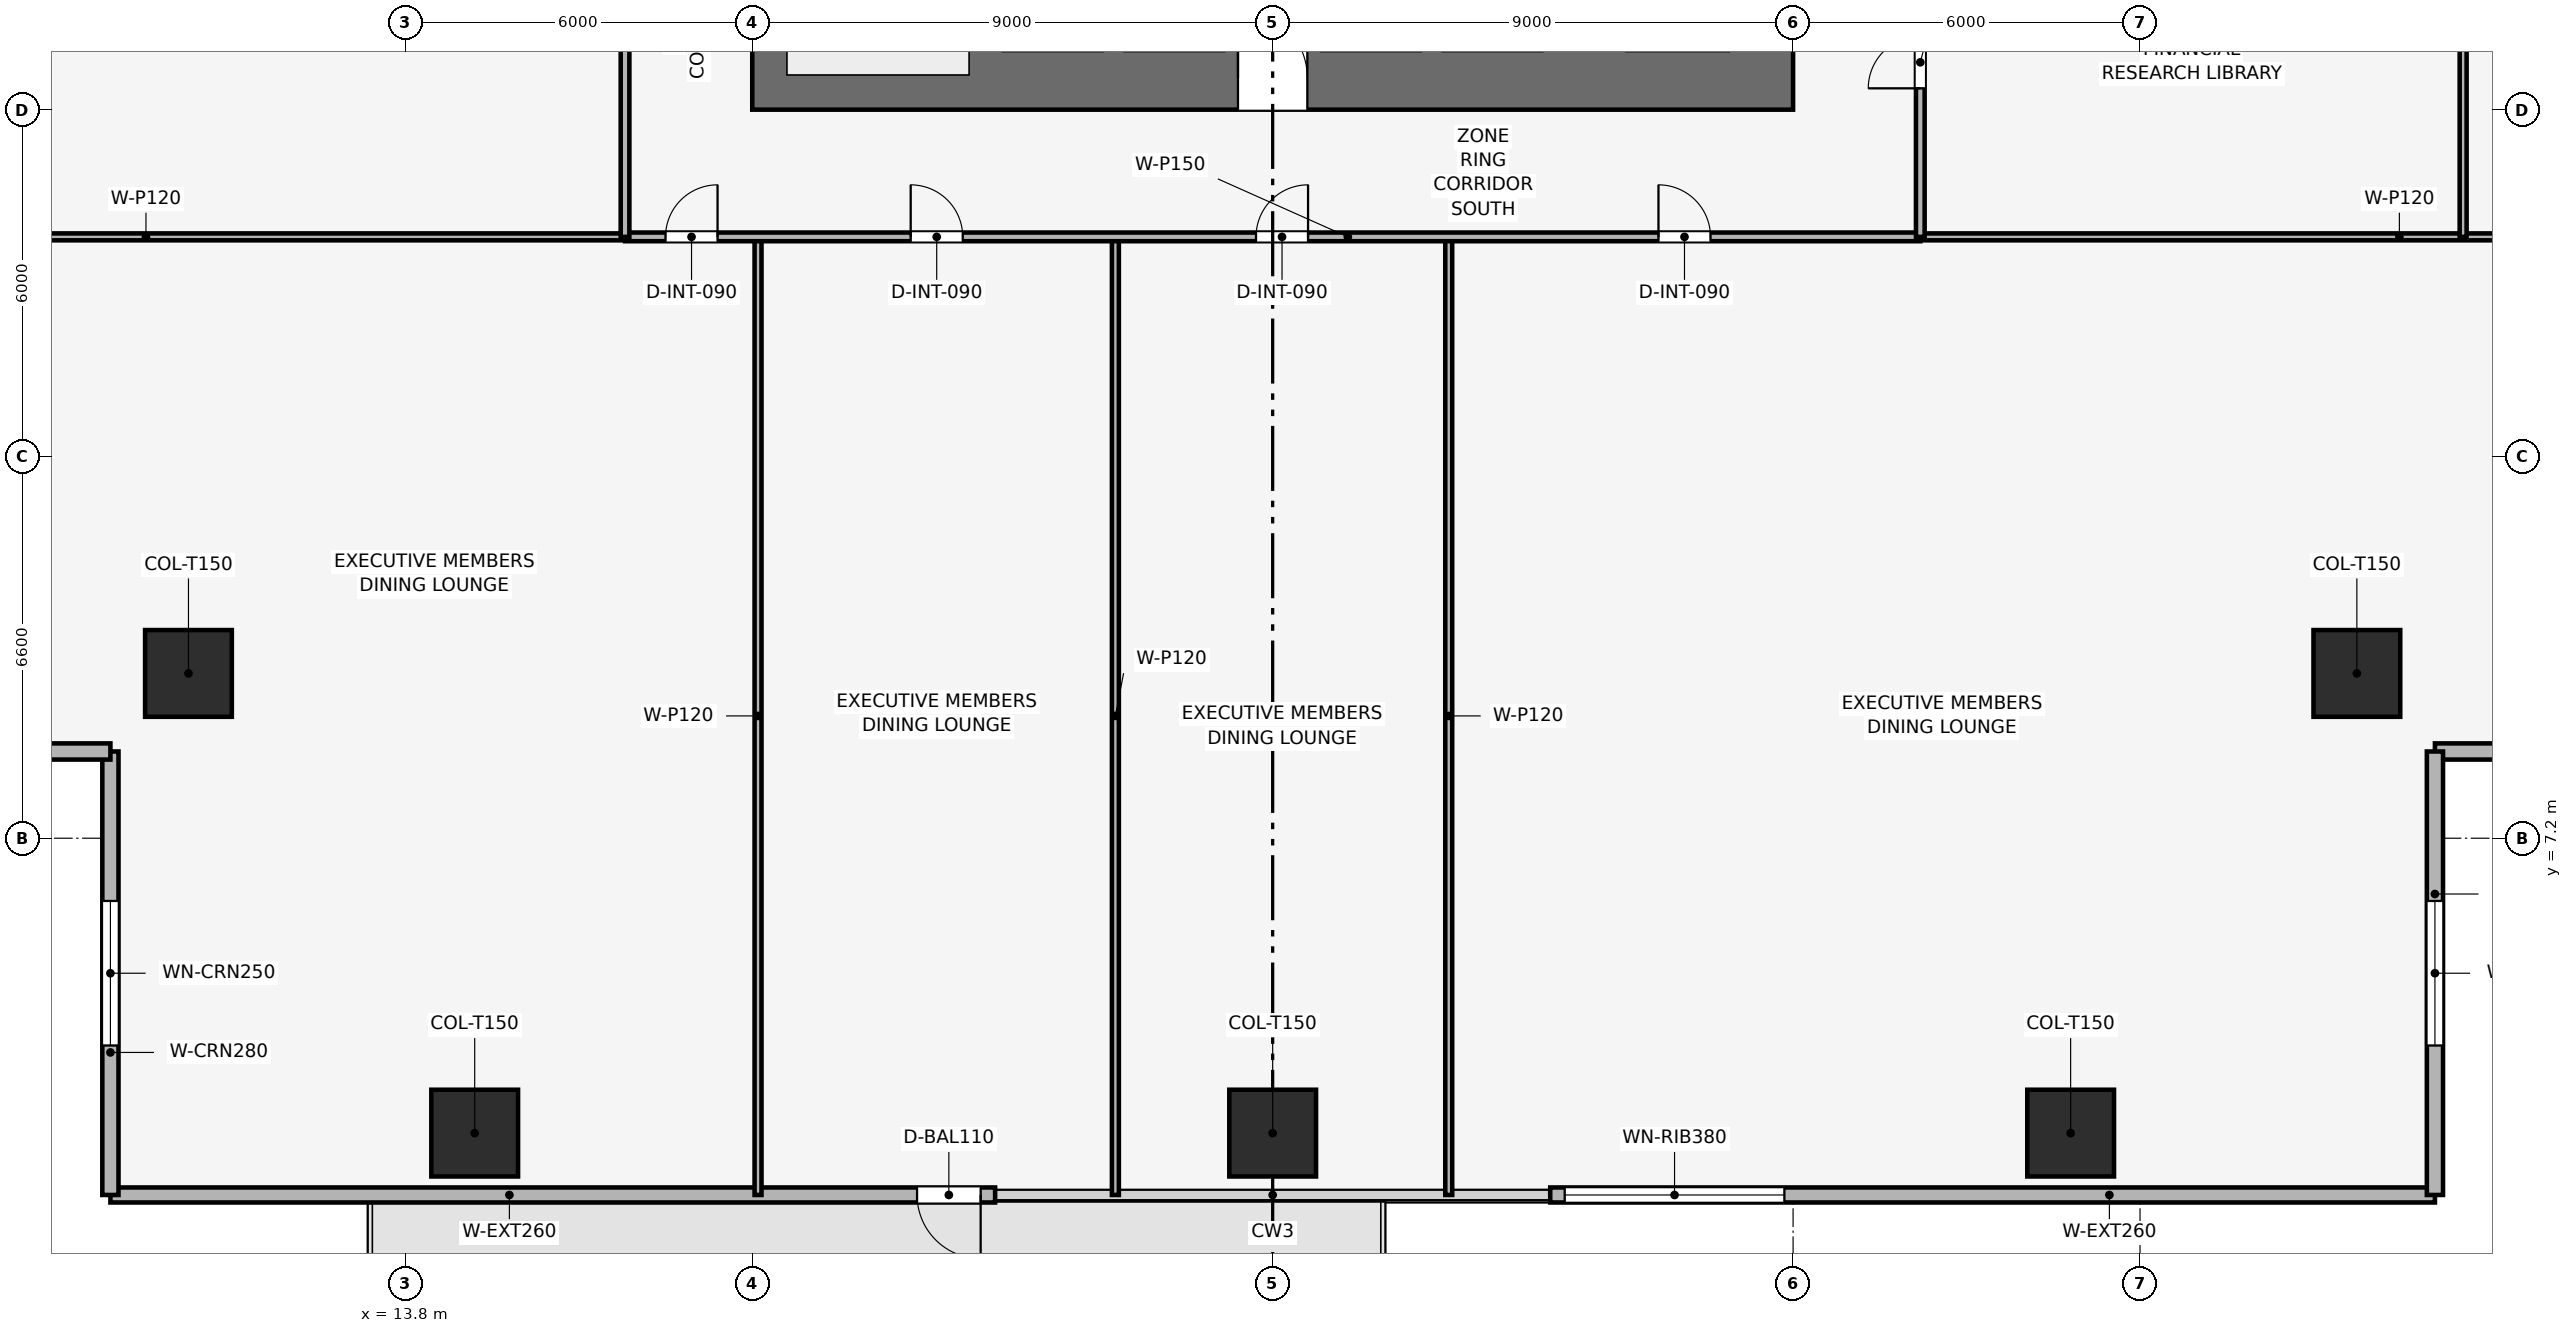
"""IFC4 building model, lengths in metres.
Left out: names, types, materials, properties, quantities, classifications, styles, units other than length and angle.
Written with IfcOpenShell. Run it as: python <this file> out.ifc"""

import sys

from ifc_helpers import new_model, si_unit, direction, frame, frame_2d, origin, origin_2d, place, context, subcontext, project, spatial, rectangle, extrude, element, fill, save


model = new_model("IFC4")
c1 = context("Model", 3, precision=1e-05, world=origin(), true_north=direction((0.0, 1.0)))
c2 = subcontext(c1, "Body", "Model", "MODEL_VIEW")
j1 = project(units=[si_unit("LENGTHUNIT", "METRE"), si_unit("PLANEANGLEUNIT", "RADIAN")], contexts=[c1])
p1 = place(None, origin())
s1 = spatial("IfcSite", under=j1, at=p1, CompositionType="ELEMENT")
p2 = place(p1, origin())
s2 = spatial("IfcBuilding", under=s1, at=p2, CompositionType="ELEMENT")
p3 = place(p2, frame((0.0, 0.0, 41.7)))
s3 = spatial("IfcBuildingStorey", under=s2, at=p3, CompositionType="ELEMENT", Elevation=41.7)
p4 = place(p3, frame((19.8, 20.35, 0.0), z_axis=(0.0, 0.0, 1.0), x_axis=(1.0, 0.0, 0.0)))
e1 = element("IfcWall", 1, at=p4, inside=s3, PredefinedType="SHEAR", context=c2, shape_type="SweptSolid", body=[
    extrude(rectangle(XDim=18.0, YDim=1.1, at=frame_2d((9.0, 0.0))), origin(), (0.0, 0.0, 1.0), 3.9),
])
p5 = place(p4, frame((8.4, 0.0, 0.0)))
e2 = element("IfcOpeningElement", 2, at=p5, cuts=e1, PredefinedType="OPENING", context=c2, shape_type="SweptSolid", body=[
    extrude(rectangle(XDim=1.2, YDim=2.2, at=frame_2d((0.6, 1.1))), frame((0.0, 0.56, 0.0), z_axis=(0.0, -1.0, 0.0), x_axis=(1.0, 0.0, 0.0)), (0.0, 0.0, 1.0), 1.12),
])
for number, where, z_axis, x_axis in (
    (3, (15.0, 2.1, 0.003), (0.0, 0.0, 1.0), (1.0, 0.0, 0.0)),
    (4, (28.8, 2.1, 0.003), (0.0, 0.0, 1.0), (1.0, 0.0, 0.0)),
    (5, (42.6, 2.1, 0.003), (0.0, 0.0, 1.0), (1.0, 0.0, 0.0)),
    (6, (10.05, 10.05, 0.003), (0.0, 0.0, 1.0), (1.0, 0.0, 0.0)),
    (7, (47.55, 10.05, 0.003), (0.0, 0.0, 1.0), (1.0, 0.0, 0.0)),
):
    element("IfcColumn", number, at=place(p3, frame(where, z_axis=z_axis, x_axis=x_axis)), inside=s3, PredefinedType="COLUMN", context=c2, shape_type="SweptSolid", body=[
        extrude(rectangle(XDim=1.5, YDim=1.5, at=origin_2d()), origin(), (0.0, 0.0, 1.0), 3.644),
    ])
p6 = place(p3, frame((48.9, 1.03, 0.0), z_axis=(0.0, 0.0, 1.0), x_axis=(-1.0, 0.0, 0.0)))
e8 = element("IfcWall", 8, at=p6, inside=s3, PredefinedType="SOLIDWALL", context=c2, shape_type="SweptSolid", body=[
    extrude(rectangle(XDim=15.3, YDim=0.26, at=frame_2d((7.65, 0.0))), origin(), (0.0, 0.0, 1.0), 3.65),
])
p7 = place(p6, frame((11.25, 0.0, 0.9)))
e9 = element("IfcOpeningElement", 9, at=p7, cuts=e8, PredefinedType="OPENING", context=c2, shape_type="SweptSolid", body=[
    extrude(rectangle(XDim=3.8, YDim=1.9, at=frame_2d((1.9, 0.95))), frame((0.0, 0.14, 0.0), z_axis=(0.0, -1.0, 0.0), x_axis=(1.0, 0.0, 0.0)), (0.0, 0.0, 1.0), 0.28),
])
p8 = place(p3, frame((24.0, 1.03, 0.0), z_axis=(0.0, 0.0, 1.0), x_axis=(-1.0, 0.0, 0.0)))
e10 = element("IfcWall", 10, at=p8, inside=s3, PredefinedType="SOLIDWALL", context=c2, shape_type="SweptSolid", body=[
    extrude(rectangle(XDim=15.3, YDim=0.26, at=frame_2d((7.65, 0.0))), origin(), (0.0, 0.0, 1.0), 3.65),
])
p9 = place(p8, frame((0.25, 0.0, 0.0)))
e11 = element("IfcOpeningElement", 11, at=p9, cuts=e10, PredefinedType="OPENING", context=c2, shape_type="SweptSolid", body=[
    extrude(rectangle(XDim=1.1, YDim=2.2, at=frame_2d((0.55, 1.1))), frame((0.0, 0.14, 0.0), z_axis=(0.0, -1.0, 0.0), x_axis=(1.0, 0.0, 0.0)), (0.0, 0.0, 1.0), 0.28),
])
p10 = place(p3, frame((8.7, 1.03, 0.0), z_axis=(0.0, 0.0, 1.0), x_axis=(0.0, 1.0, 0.0)))
e12 = element("IfcWall", 12, at=p10, inside=s3, PredefinedType="SOLIDWALL", context=c2, shape_type="SweptSolid", body=[
    extrude(rectangle(XDim=7.67, YDim=0.28, at=frame_2d((3.835, 0.0))), origin(), (0.0, 0.0, 1.0), 3.65),
])
p11 = place(p10, frame((2.585, 0.0, 0.9)))
e13 = element("IfcOpeningElement", 13, at=p11, cuts=e12, PredefinedType="OPENING", context=c2, shape_type="SweptSolid", body=[
    extrude(rectangle(XDim=2.5, YDim=1.9, at=frame_2d((1.25, 0.95))), frame((0.0, 0.15, 0.0), z_axis=(0.0, -1.0, 0.0), x_axis=(1.0, 0.0, 0.0)), (0.0, 0.0, 1.0), 0.3),
])
p12 = place(p3, frame((8.7, 8.7, 0.0), z_axis=(0.0, 0.0, 1.0), x_axis=(-1.0, 0.0, 0.0)))
e14 = element("IfcWall", 14, at=p12, inside=s3, PredefinedType="SOLIDWALL", context=c2, shape_type="SweptSolid", body=[
    extrude(rectangle(XDim=7.67, YDim=0.28, at=frame_2d((3.835, 0.0))), origin(), (0.0, 0.0, 1.0), 3.65),
])
p13 = place(p12, frame((2.585, 0.0, 0.9)))
e15 = element("IfcOpeningElement", 15, at=p13, cuts=e14, PredefinedType="OPENING", context=c2, shape_type="SweptSolid", body=[
    extrude(rectangle(XDim=2.5, YDim=1.9, at=frame_2d((1.25, 0.95))), frame((0.0, 0.15, 0.0), z_axis=(0.0, -1.0, 0.0), x_axis=(1.0, 0.0, 0.0)), (0.0, 0.0, 1.0), 0.3),
])
p14 = place(p3, frame((56.57, 8.7, 0.0), z_axis=(0.0, 0.0, 1.0), x_axis=(-1.0, 0.0, 0.0)))
e16 = element("IfcWall", 16, at=p14, inside=s3, PredefinedType="SOLIDWALL", context=c2, shape_type="SweptSolid", body=[
    extrude(rectangle(XDim=7.67, YDim=0.28, at=frame_2d((3.835, 0.0))), origin(), (0.0, 0.0, 1.0), 3.65),
])
p15 = place(p14, frame((2.585, 0.0, 0.9)))
e17 = element("IfcOpeningElement", 17, at=p15, cuts=e16, PredefinedType="OPENING", context=c2, shape_type="SweptSolid", body=[
    extrude(rectangle(XDim=2.5, YDim=1.9, at=frame_2d((1.25, 0.95))), frame((0.0, 0.15, 0.0), z_axis=(0.0, -1.0, 0.0), x_axis=(1.0, 0.0, 0.0)), (0.0, 0.0, 1.0), 0.3),
])
p16 = place(p3, frame((48.9, 8.7, 0.0), z_axis=(0.0, 0.0, 1.0), x_axis=(0.0, -1.0, 0.0)))
e18 = element("IfcWall", 18, at=p16, inside=s3, PredefinedType="SOLIDWALL", context=c2, shape_type="SweptSolid", body=[
    extrude(rectangle(XDim=7.67, YDim=0.28, at=frame_2d((3.835, 0.0))), origin(), (0.0, 0.0, 1.0), 3.65),
])
p17 = place(p16, frame((2.585, 0.0, 0.9)))
e19 = element("IfcOpeningElement", 19, at=p17, cuts=e18, PredefinedType="OPENING", context=c2, shape_type="SweptSolid", body=[
    extrude(rectangle(XDim=2.5, YDim=1.9, at=frame_2d((1.25, 0.95))), frame((0.0, 0.15, 0.0), z_axis=(0.0, -1.0, 0.0), x_axis=(1.0, 0.0, 0.0)), (0.0, 0.0, 1.0), 0.3),
])
for number, where, z_axis, x_axis in (
    (20, (19.9, 1.03, 0.0), (0.0, 0.0, 1.0), (0.0, 1.0, 0.0)),
    (21, (26.08, 1.03, 0.0), (0.0, 0.0, 1.0), (0.0, 1.0, 0.0)),
    (22, (31.845, 1.03, 0.0), (0.0, 0.0, 1.0), (0.0, 1.0, 0.0)),
    (23, (1.03, 17.6, 0.0), (0.0, 0.0, 1.0), (1.0, 0.0, 0.0)),
    (24, (40.0, 17.6, 0.0), (0.0, 0.0, 1.0), (1.0, 0.0, 0.0)),
):
    element("IfcWall", number, at=place(p3, frame(where, z_axis=z_axis, x_axis=x_axis)), inside=s3, PredefinedType="PARTITIONING", context=c2, shape_type="SweptSolid", body=[
        extrude(rectangle(XDim=16.57, YDim=0.12, at=frame_2d((8.285, 0.0))), origin(), (0.0, 0.0, 1.0), 2.935),
    ])
p18 = place(p3, frame((49.388, 17.6, 0.0), z_axis=(0.0, 0.0, 1.0), x_axis=(0.0, 1.0, 0.0)))
e25 = element("IfcWall", 25, at=p18, inside=s3, PredefinedType="PARTITIONING", context=c2, shape_type="SweptSolid", body=[
    extrude(rectangle(XDim=6.038, YDim=0.12, at=frame_2d((3.019, 0.0))), origin(), (0.0, 0.0, 1.0), 3.085),
])
p19 = place(p18, frame((3.753, 0.0, 0.0)))
e26 = element("IfcOpeningElement", 26, at=p19, cuts=e25, PredefinedType="OPENING", context=c2, shape_type="SweptSolid", body=[
    extrude(rectangle(XDim=0.9, YDim=2.1, at=frame_2d((0.45, 1.05))), frame((0.0, 0.07, 0.0), z_axis=(0.0, -1.0, 0.0), x_axis=(1.0, 0.0, 0.0)), (0.0, 0.0, 1.0), 0.14),
])
p20 = place(p3, frame((17.6, 17.6, 0.0), z_axis=(0.0, 0.0, 1.0), x_axis=(1.0, 0.0, 0.0)))
e27 = element("IfcWall", 27, at=p20, inside=s3, PredefinedType="PARTITIONING", context=c2, shape_type="SweptSolid", body=[
    extrude(rectangle(XDim=22.4, YDim=0.15, at=frame_2d((11.2, 0.0))), origin(), (0.0, 0.0, 1.0), 3.085),
])
p21 = place(p20, frame((0.7, 0.0, 0.0)))
e28 = element("IfcOpeningElement", 28, at=p21, cuts=e27, PredefinedType="OPENING", context=c2, shape_type="SweptSolid", body=[
    extrude(rectangle(XDim=0.9, YDim=2.1, at=frame_2d((0.45, 1.05))), frame((0.0, 0.085, 0.0), z_axis=(0.0, -1.0, 0.0), x_axis=(1.0, 0.0, 0.0)), (0.0, 0.0, 1.0), 0.17),
])
p22 = place(p20, frame((4.94, 0.0, 0.0)))
e29 = element("IfcOpeningElement", 29, at=p22, cuts=e27, PredefinedType="OPENING", context=c2, shape_type="SweptSolid", body=[
    extrude(rectangle(XDim=0.9, YDim=2.1, at=frame_2d((0.45, 1.05))), frame((0.0, 0.085, 0.0), z_axis=(0.0, -1.0, 0.0), x_axis=(1.0, 0.0, 0.0)), (0.0, 0.0, 1.0), 0.17),
])
p23 = place(p20, frame((10.912, 0.0, 0.0)))
e30 = element("IfcOpeningElement", 30, at=p23, cuts=e27, PredefinedType="OPENING", context=c2, shape_type="SweptSolid", body=[
    extrude(rectangle(XDim=0.9, YDim=2.1, at=frame_2d((0.45, 1.05))), frame((0.0, 0.085, 0.0), z_axis=(0.0, -1.0, 0.0), x_axis=(1.0, 0.0, 0.0)), (0.0, 0.0, 1.0), 0.17),
])
p24 = place(p20, frame((17.872, 0.0, 0.0)))
e31 = element("IfcOpeningElement", 31, at=p24, cuts=e27, PredefinedType="OPENING", context=c2, shape_type="SweptSolid", body=[
    extrude(rectangle(XDim=0.9, YDim=2.1, at=frame_2d((0.45, 1.05))), frame((0.0, 0.085, 0.0), z_axis=(0.0, -1.0, 0.0), x_axis=(1.0, 0.0, 0.0)), (0.0, 0.0, 1.0), 0.17),
])
p25 = place(p3, frame((17.6, 17.6, 0.0), z_axis=(0.0, 0.0, 1.0), x_axis=(0.0, 1.0, 0.0)))
e32 = element("IfcWall", 32, at=p25, inside=s3, PredefinedType="PARTITIONING", context=c2, shape_type="SweptSolid", body=[
    extrude(rectangle(XDim=22.4, YDim=0.15, at=frame_2d((11.2, 0.0))), origin(), (0.0, 0.0, 1.0), 3.085),
])
p26 = place(p25, frame((10.75, 0.0, 0.0)))
e33 = element("IfcOpeningElement", 33, at=p26, cuts=e32, PredefinedType="OPENING", context=c2, shape_type="SweptSolid", body=[
    extrude(rectangle(XDim=0.9, YDim=2.1, at=frame_2d((0.45, 1.05))), frame((0.0, 0.085, 0.0), z_axis=(0.0, -1.0, 0.0), x_axis=(1.0, 0.0, 0.0)), (0.0, 0.0, 1.0), 0.17),
])
p27 = place(p3, frame((40.0, 17.6, 0.0), z_axis=(0.0, 0.0, 1.0), x_axis=(0.0, 1.0, 0.0)))
e34 = element("IfcWall", 34, at=p27, inside=s3, PredefinedType="PARTITIONING", context=c2, shape_type="SweptSolid", body=[
    extrude(rectangle(XDim=22.4, YDim=0.15, at=frame_2d((11.2, 0.0))), origin(), (0.0, 0.0, 1.0), 3.085),
])
p28 = place(p27, frame((2.569, 0.0, 0.0)))
e35 = element("IfcOpeningElement", 35, at=p28, cuts=e34, PredefinedType="OPENING", context=c2, shape_type="SweptSolid", body=[
    extrude(rectangle(XDim=0.9, YDim=2.1, at=frame_2d((0.45, 1.05))), frame((0.0, 0.085, 0.0), z_axis=(0.0, -1.0, 0.0), x_axis=(1.0, 0.0, 0.0)), (0.0, 0.0, 1.0), 0.17),
])
p29 = place(p27, frame((13.769, 0.0, 0.0)))
e36 = element("IfcOpeningElement", 36, at=p29, cuts=e34, PredefinedType="OPENING", context=c2, shape_type="SweptSolid", body=[
    extrude(rectangle(XDim=0.9, YDim=2.1, at=frame_2d((0.45, 1.05))), frame((0.0, 0.085, 0.0), z_axis=(0.0, -1.0, 0.0), x_axis=(1.0, 0.0, 0.0)), (0.0, 0.0, 1.0), 0.17),
])
p30 = place(p9, origin())
e37 = element("IfcDoor", 37, at=p30, inside=s3, OperationType="SINGLE_SWING_LEFT", PredefinedType="DOOR", context=c2, shape_type="SweptSolid", body=[
    extrude(rectangle(XDim=1.1, YDim=2.2, at=frame_2d((0.55, 1.1))), frame((0.0, 0.025, 0.0), z_axis=(0.0, -1.0, 0.0), x_axis=(1.0, 0.0, 0.0)), (0.0, 0.0, 1.0), 0.05),
])
fill(e11, e37)
p31 = place(p7, origin())
e38 = element("IfcWindow", 38, at=p31, inside=s3, PartitioningType="SINGLE_PANEL", PredefinedType="WINDOW", context=c2, shape_type="SweptSolid", body=[
    extrude(rectangle(XDim=3.8, YDim=1.9, at=frame_2d((1.9, 0.95))), frame((0.0, 0.03, 0.0), z_axis=(0.0, -1.0, 0.0), x_axis=(1.0, 0.0, 0.0)), (0.0, 0.0, 1.0), 0.06),
])
fill(e9, e38)
p32 = place(p11, origin())
e39 = element("IfcWindow", 39, at=p32, inside=s3, PartitioningType="SINGLE_PANEL", PredefinedType="WINDOW", context=c2, shape_type="SweptSolid", body=[
    extrude(rectangle(XDim=2.5, YDim=1.9, at=frame_2d((1.25, 0.95))), frame((0.0, 0.03, 0.0), z_axis=(0.0, -1.0, 0.0), x_axis=(1.0, 0.0, 0.0)), (0.0, 0.0, 1.0), 0.06),
])
fill(e13, e39)
p33 = place(p17, origin())
e40 = element("IfcWindow", 40, at=p33, inside=s3, PartitioningType="SINGLE_PANEL", PredefinedType="WINDOW", context=c2, shape_type="SweptSolid", body=[
    extrude(rectangle(XDim=2.5, YDim=1.9, at=frame_2d((1.25, 0.95))), frame((0.0, 0.03, 0.0), z_axis=(0.0, -1.0, 0.0), x_axis=(1.0, 0.0, 0.0)), (0.0, 0.0, 1.0), 0.06),
])
fill(e19, e40)
p34 = place(p21, origin())
e41 = element("IfcDoor", 41, at=p34, inside=s3, OperationType="SINGLE_SWING_RIGHT", PredefinedType="DOOR", context=c2, shape_type="SweptSolid", body=[
    extrude(rectangle(XDim=0.9, YDim=2.1, at=frame_2d((0.45, 1.05))), frame((0.0, 0.025, 0.0), z_axis=(0.0, -1.0, 0.0), x_axis=(1.0, 0.0, 0.0)), (0.0, 0.0, 1.0), 0.05),
])
fill(e28, e41)
p35 = place(p22, origin())
e42 = element("IfcDoor", 42, at=p35, inside=s3, OperationType="SINGLE_SWING_LEFT", PredefinedType="DOOR", context=c2, shape_type="SweptSolid", body=[
    extrude(rectangle(XDim=0.9, YDim=2.1, at=frame_2d((0.45, 1.05))), frame((0.0, 0.025, 0.0), z_axis=(0.0, -1.0, 0.0), x_axis=(1.0, 0.0, 0.0)), (0.0, 0.0, 1.0), 0.05),
])
fill(e29, e42)
p36 = place(p23, origin())
e43 = element("IfcDoor", 43, at=p36, inside=s3, OperationType="SINGLE_SWING_RIGHT", PredefinedType="DOOR", context=c2, shape_type="SweptSolid", body=[
    extrude(rectangle(XDim=0.9, YDim=2.1, at=frame_2d((0.45, 1.05))), frame((0.0, 0.025, 0.0), z_axis=(0.0, -1.0, 0.0), x_axis=(1.0, 0.0, 0.0)), (0.0, 0.0, 1.0), 0.05),
])
fill(e30, e43)
p37 = place(p24, origin())
e44 = element("IfcDoor", 44, at=p37, inside=s3, OperationType="SINGLE_SWING_LEFT", PredefinedType="DOOR", context=c2, shape_type="SweptSolid", body=[
    extrude(rectangle(XDim=0.9, YDim=2.1, at=frame_2d((0.45, 1.05))), frame((0.0, 0.025, 0.0), z_axis=(0.0, -1.0, 0.0), x_axis=(1.0, 0.0, 0.0)), (0.0, 0.0, 1.0), 0.05),
])
fill(e31, e44)
p38 = place(p28, origin())
e45 = element("IfcDoor", 45, at=p38, inside=s3, OperationType="SINGLE_SWING_LEFT", PredefinedType="DOOR", context=c2, shape_type="SweptSolid", body=[
    extrude(rectangle(XDim=0.9, YDim=2.1, at=frame_2d((0.45, 1.05))), frame((0.0, 0.025, 0.0), z_axis=(0.0, -1.0, 0.0), x_axis=(1.0, 0.0, 0.0)), (0.0, 0.0, 1.0), 0.05),
])
fill(e35, e45)
p39 = place(p5, origin())
e46 = element("IfcDoor", 46, at=p39, inside=s3, OperationType="SINGLE_SWING_LEFT", PredefinedType="DOOR", context=c2, shape_type="SweptSolid", body=[
    extrude(rectangle(XDim=1.2, YDim=2.2, at=frame_2d((0.6, 1.1))), frame((0.0, 0.025, 0.0), z_axis=(0.0, -1.0, 0.0), x_axis=(1.0, 0.0, 0.0)), (0.0, 0.0, 1.0), 0.05),
])
fill(e2, e46)
save(model, sys.argv[1])
